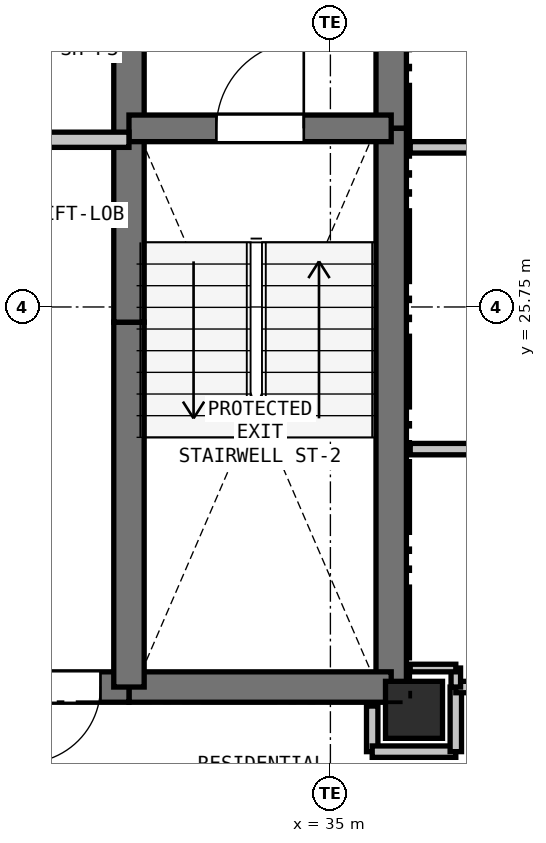
"""IFC4 building model, lengths in metres.
Left out: names, types, materials, properties, quantities, classifications, styles, units other than length and angle.
Written with IfcOpenShell. Run it as: python <this file> out.ifc"""

import sys

from ifc_helpers import new_model, si_unit, direction, frame, frame_2d, origin, origin_2d, place, context, subcontext, project, spatial, rectangle, extrude, element, fill, save


model = new_model("IFC4")
c1 = context("Model", 3, precision=1e-05, world=origin(), true_north=direction((0.0, 1.0)))
c2 = subcontext(c1, "Body", "Model", "MODEL_VIEW")
j1 = project(units=[si_unit("LENGTHUNIT", "METRE"), si_unit("PLANEANGLEUNIT", "RADIAN")], contexts=[c1])
p1 = place(None, origin())
s1 = spatial("IfcSite", under=j1, at=p1, CompositionType="ELEMENT")
p2 = place(p1, origin())
s2 = spatial("IfcBuilding", under=s1, at=p2, CompositionType="ELEMENT")
p3 = place(p2, frame((0.0, 0.0, 121.2)))
s3 = spatial("IfcBuildingStorey", under=s2, at=p3, CompositionType="ELEMENT", Elevation=121.2)
p4 = place(p3, frame((36.1, 20.45, 0.0), z_axis=(0.0, 0.0, 1.0), x_axis=(1.0, 0.0, 0.0)))
e1 = element("IfcColumn", 1, at=p4, inside=s3, PredefinedType="COLUMN", context=c2, shape_type="SweptSolid", body=[
    extrude(rectangle(XDim=0.75, YDim=0.75, at=origin_2d()), origin(), (0.0, 0.0, 1.0), 3.3),
])
p5 = place(p3, frame((35.8, 32.75, 0.0), z_axis=(0.0, 0.0, 1.0), x_axis=(0.0, -1.0, 0.0)))
e2 = element("IfcWall", 2, at=p5, inside=s3, PredefinedType="SHEAR", context=c2, shape_type="SweptSolid", body=[
    extrude(rectangle(XDim=4.65, YDim=0.4, at=frame_2d((2.325, 0.0))), origin(), (0.0, 0.0, 1.0), 3.06),
])
p6 = place(p3, frame((35.8, 28.1, 0.0), z_axis=(0.0, 0.0, 1.0), x_axis=(0.0, -1.0, 0.0)))
e3 = element("IfcWall", 3, at=p6, inside=s3, PredefinedType="SHEAR", context=c2, shape_type="SweptSolid", body=[
    extrude(rectangle(XDim=7.35, YDim=0.4, at=frame_2d((3.675, 0.0))), origin(), (0.0, 0.0, 1.0), 3.06),
])
p7 = place(p3, frame((35.8, 20.75, 0.0), z_axis=(0.0, 0.0, 1.0), x_axis=(-1.0, 0.0, 0.0)))
e4 = element("IfcWall", 4, at=p7, inside=s3, PredefinedType="SHEAR", context=c2, shape_type="SweptSolid", body=[
    extrude(rectangle(XDim=3.45, YDim=0.4, at=frame_2d((1.725, 0.0))), origin(), (0.0, 0.0, 1.0), 3.06),
])
p8 = place(p3, frame((32.35, 20.75, 0.0), z_axis=(0.0, 0.0, 1.0), x_axis=(-1.0, 0.0, 0.0)))
e5 = element("IfcWall", 5, at=p8, inside=s3, PredefinedType="SHEAR", context=c2, shape_type="SweptSolid", body=[
    extrude(rectangle(XDim=1.75, YDim=0.4, at=frame_2d((0.875, 0.0))), origin(), (0.0, 0.0, 1.0), 3.06),
])
p9 = place(p8, frame((0.375, 0.0, 0.0)))
e6 = element("IfcOpeningElement", 6, at=p9, cuts=e5, PredefinedType="OPENING", context=c2, shape_type="SweptSolid", body=[
    extrude(rectangle(XDim=1.0, YDim=2.15, at=frame_2d((0.5, 1.075))), frame((0.0, 0.21, 0.0), z_axis=(0.0, -1.0, 0.0), x_axis=(1.0, 0.0, 0.0)), (0.0, 0.0, 1.0), 0.42),
])
p10 = place(p3, frame((32.35, 20.75, 0.0), z_axis=(0.0, 0.0, 1.0), x_axis=(0.0, 1.0, 0.0)))
e7 = element("IfcWall", 7, at=p10, inside=s3, PredefinedType="SHEAR", context=c2, shape_type="SweptSolid", body=[
    extrude(rectangle(XDim=4.8, YDim=0.4, at=frame_2d((2.4, 0.0))), origin(), (0.0, 0.0, 1.0), 3.06),
])
p11 = place(p3, frame((32.35, 25.55, 0.0), z_axis=(0.0, 0.0, 1.0), x_axis=(0.0, 1.0, 0.0)))
e8 = element("IfcWall", 8, at=p11, inside=s3, PredefinedType="SHEAR", context=c2, shape_type="SweptSolid", body=[
    extrude(rectangle(XDim=2.4, YDim=0.4, at=frame_2d((1.2, 0.0))), origin(), (0.0, 0.0, 1.0), 3.06),
])
p12 = place(p3, frame((32.35, 27.95, 0.0), z_axis=(0.0, 0.0, 1.0), x_axis=(0.0, 1.0, 0.0)))
e9 = element("IfcWall", 9, at=p12, inside=s3, PredefinedType="SHEAR", context=c2, shape_type="SweptSolid", body=[
    extrude(rectangle(XDim=2.8, YDim=0.4, at=frame_2d((1.4, 0.0))), origin(), (0.0, 0.0, 1.0), 3.06),
])
p13 = place(p3, frame((32.35, 28.1, 0.0), z_axis=(0.0, 0.0, 1.0), x_axis=(1.0, 0.0, 0.0)))
e10 = element("IfcWall", 10, at=p13, inside=s3, PredefinedType="SHEAR", context=c2, shape_type="SweptSolid", body=[
    extrude(rectangle(XDim=3.45, YDim=0.35, at=frame_2d((1.725, 0.0))), origin(), (0.0, 0.0, 1.0), 3.06),
])
p14 = place(p13, frame((1.15, 0.0, 0.0)))
e11 = element("IfcOpeningElement", 11, at=p14, cuts=e10, PredefinedType="OPENING", context=c2, shape_type="SweptSolid", body=[
    extrude(rectangle(XDim=1.15, YDim=2.15, at=frame_2d((0.575, 1.075))), frame((0.0, 0.185, 0.0), z_axis=(0.0, -1.0, 0.0), x_axis=(1.0, 0.0, 0.0)), (0.0, 0.0, 1.0), 0.37),
])
p15 = place(p3, frame((27.4, 27.95, 0.0), z_axis=(0.0, 0.0, 1.0), x_axis=(1.0, 0.0, 0.0)))
e12 = element("IfcWall", 12, at=p15, inside=s3, PredefinedType="PARTITIONING", context=c2, shape_type="SweptSolid", body=[
    extrude(rectangle(XDim=4.95, YDim=0.2, at=frame_2d((2.475, 0.0))), origin(), (0.0, 0.0, 1.0), 3.06),
])
p16 = place(p3, frame((35.55, 20.5, 0.0), z_axis=(0.0, 0.0, 1.0), x_axis=(0.0, -1.0, 0.0)))
e13 = element("IfcWall", 13, at=p16, inside=s3, PredefinedType="PARTITIONING", context=c2, shape_type="SweptSolid", body=[
    extrude(rectangle(XDim=0.6, YDim=0.15, at=frame_2d((0.3, 0.0))), origin(), (0.0, 0.0, 1.0), 2.508),
])
p17 = place(p3, frame((35.55, 19.9, 0.0), z_axis=(0.0, 0.0, 1.0), x_axis=(1.0, 0.0, 0.0)))
e14 = element("IfcWall", 14, at=p17, inside=s3, PredefinedType="PARTITIONING", context=c2, shape_type="SweptSolid", body=[
    extrude(rectangle(XDim=1.1, YDim=0.15, at=frame_2d((0.55, 0.0))), origin(), (0.0, 0.0, 1.0), 2.433),
])
p18 = place(p3, frame((36.65, 19.9, 0.0), z_axis=(0.0, 0.0, 1.0), x_axis=(0.0, 1.0, 0.0)))
e15 = element("IfcWall", 15, at=p18, inside=s3, PredefinedType="PARTITIONING", context=c2, shape_type="SweptSolid", body=[
    extrude(rectangle(XDim=0.85, YDim=0.15, at=frame_2d((0.425, 0.0))), origin(), (0.0, 0.0, 1.0), 3.06),
])
p19 = place(p3, frame((36.65, 20.75, 0.0), z_axis=(0.0, 0.0, 1.0), x_axis=(1.0, 0.0, 0.0)))
e16 = element("IfcWall", 16, at=p19, inside=s3, PredefinedType="PARTITIONING", context=c2, shape_type="SweptSolid", body=[
    extrude(rectangle(XDim=2.55, YDim=0.15, at=frame_2d((1.275, 0.0))), origin(), (0.0, 0.0, 1.0), 3.06),
])
p20 = place(p19, frame((0.775, 0.0, 0.0)))
e17 = element("IfcOpeningElement", 17, at=p20, cuts=e16, PredefinedType="OPENING", context=c2, shape_type="SweptSolid", body=[
    extrude(rectangle(XDim=1.0, YDim=2.15, at=frame_2d((0.5, 1.075))), frame((0.0, 0.085, 0.0), z_axis=(0.0, -1.0, 0.0), x_axis=(1.0, 0.0, 0.0)), (0.0, 0.0, 1.0), 0.17),
])
p21 = place(p3, frame((42.181, 27.85, 0.0), z_axis=(0.0, 0.0, 1.0), x_axis=(-1.0, 0.0, 0.0)))
e18 = element("IfcWall", 18, at=p21, inside=s3, PredefinedType="PARTITIONING", context=c2, shape_type="SweptSolid", body=[
    extrude(rectangle(XDim=6.131, YDim=0.15, at=frame_2d((3.065, 0.0))), origin(), (0.0, 0.0, 1.0), 2.365),
])
p22 = place(p21, frame((2.641, 0.0, 0.0)))
e19 = element("IfcOpeningElement", 19, at=p22, cuts=e18, PredefinedType="OPENING", context=c2, shape_type="SweptSolid", body=[
    extrude(rectangle(XDim=0.85, YDim=2.1, at=frame_2d((0.425, 1.05))), frame((0.0, 0.085, 0.0), z_axis=(0.0, -1.0, 0.0), x_axis=(1.0, 0.0, 0.0)), (0.0, 0.0, 1.0), 0.17),
])
p23 = place(p3, frame((36.65, 20.75, 0.0), z_axis=(0.0, 0.0, 1.0), x_axis=(0.0, 1.0, 0.0)))
e20 = element("IfcWall", 20, at=p23, inside=s3, PredefinedType="PARTITIONING", context=c2, shape_type="SweptSolid", body=[
    extrude(rectangle(XDim=0.25, YDim=0.125, at=frame_2d((0.125, 0.0))), origin(), (0.0, 0.0, 1.0), 3.06),
])
p24 = place(p3, frame((36.65, 21.0, 0.0), z_axis=(0.0, 0.0, 1.0), x_axis=(-1.0, 0.0, 0.0)))
e21 = element("IfcWall", 21, at=p24, inside=s3, PredefinedType="PARTITIONING", context=c2, shape_type="SweptSolid", body=[
    extrude(rectangle(XDim=0.6, YDim=0.1, at=frame_2d((0.3, 0.0))), origin(), (0.0, 0.0, 1.0), 2.508),
])
p25 = place(p3, frame((36.05, 23.88, 0.0), z_axis=(0.0, 0.0, 1.0), x_axis=(1.0, 0.0, 0.0)))
e22 = element("IfcWall", 22, at=p25, inside=s3, PredefinedType="PARTITIONING", context=c2, shape_type="SweptSolid", body=[
    extrude(rectangle(XDim=6.131, YDim=0.15, at=frame_2d((3.065, 0.0))), origin(), (0.0, 0.0, 1.0), 2.365),
])
p26 = place(p9, origin())
e23 = element("IfcDoor", 23, at=p26, inside=s3, OperationType="SINGLE_SWING_RIGHT", PredefinedType="DOOR", context=c2, shape_type="SweptSolid", body=[
    extrude(rectangle(XDim=1.0, YDim=2.15, at=frame_2d((0.5, 1.075))), frame((0.0, 0.025, 0.0), z_axis=(0.0, -1.0, 0.0), x_axis=(1.0, 0.0, 0.0)), (0.0, 0.0, 1.0), 0.05),
])
fill(e6, e23)
p27 = place(p14, origin())
e24 = element("IfcDoor", 24, at=p27, inside=s3, OperationType="SINGLE_SWING_RIGHT", PredefinedType="DOOR", context=c2, shape_type="SweptSolid", body=[
    extrude(rectangle(XDim=1.15, YDim=2.15, at=frame_2d((0.575, 1.075))), frame((0.0, 0.025, 0.0), z_axis=(0.0, -1.0, 0.0), x_axis=(1.0, 0.0, 0.0)), (0.0, 0.0, 1.0), 0.05),
])
fill(e11, e24)
save(model, sys.argv[1])
